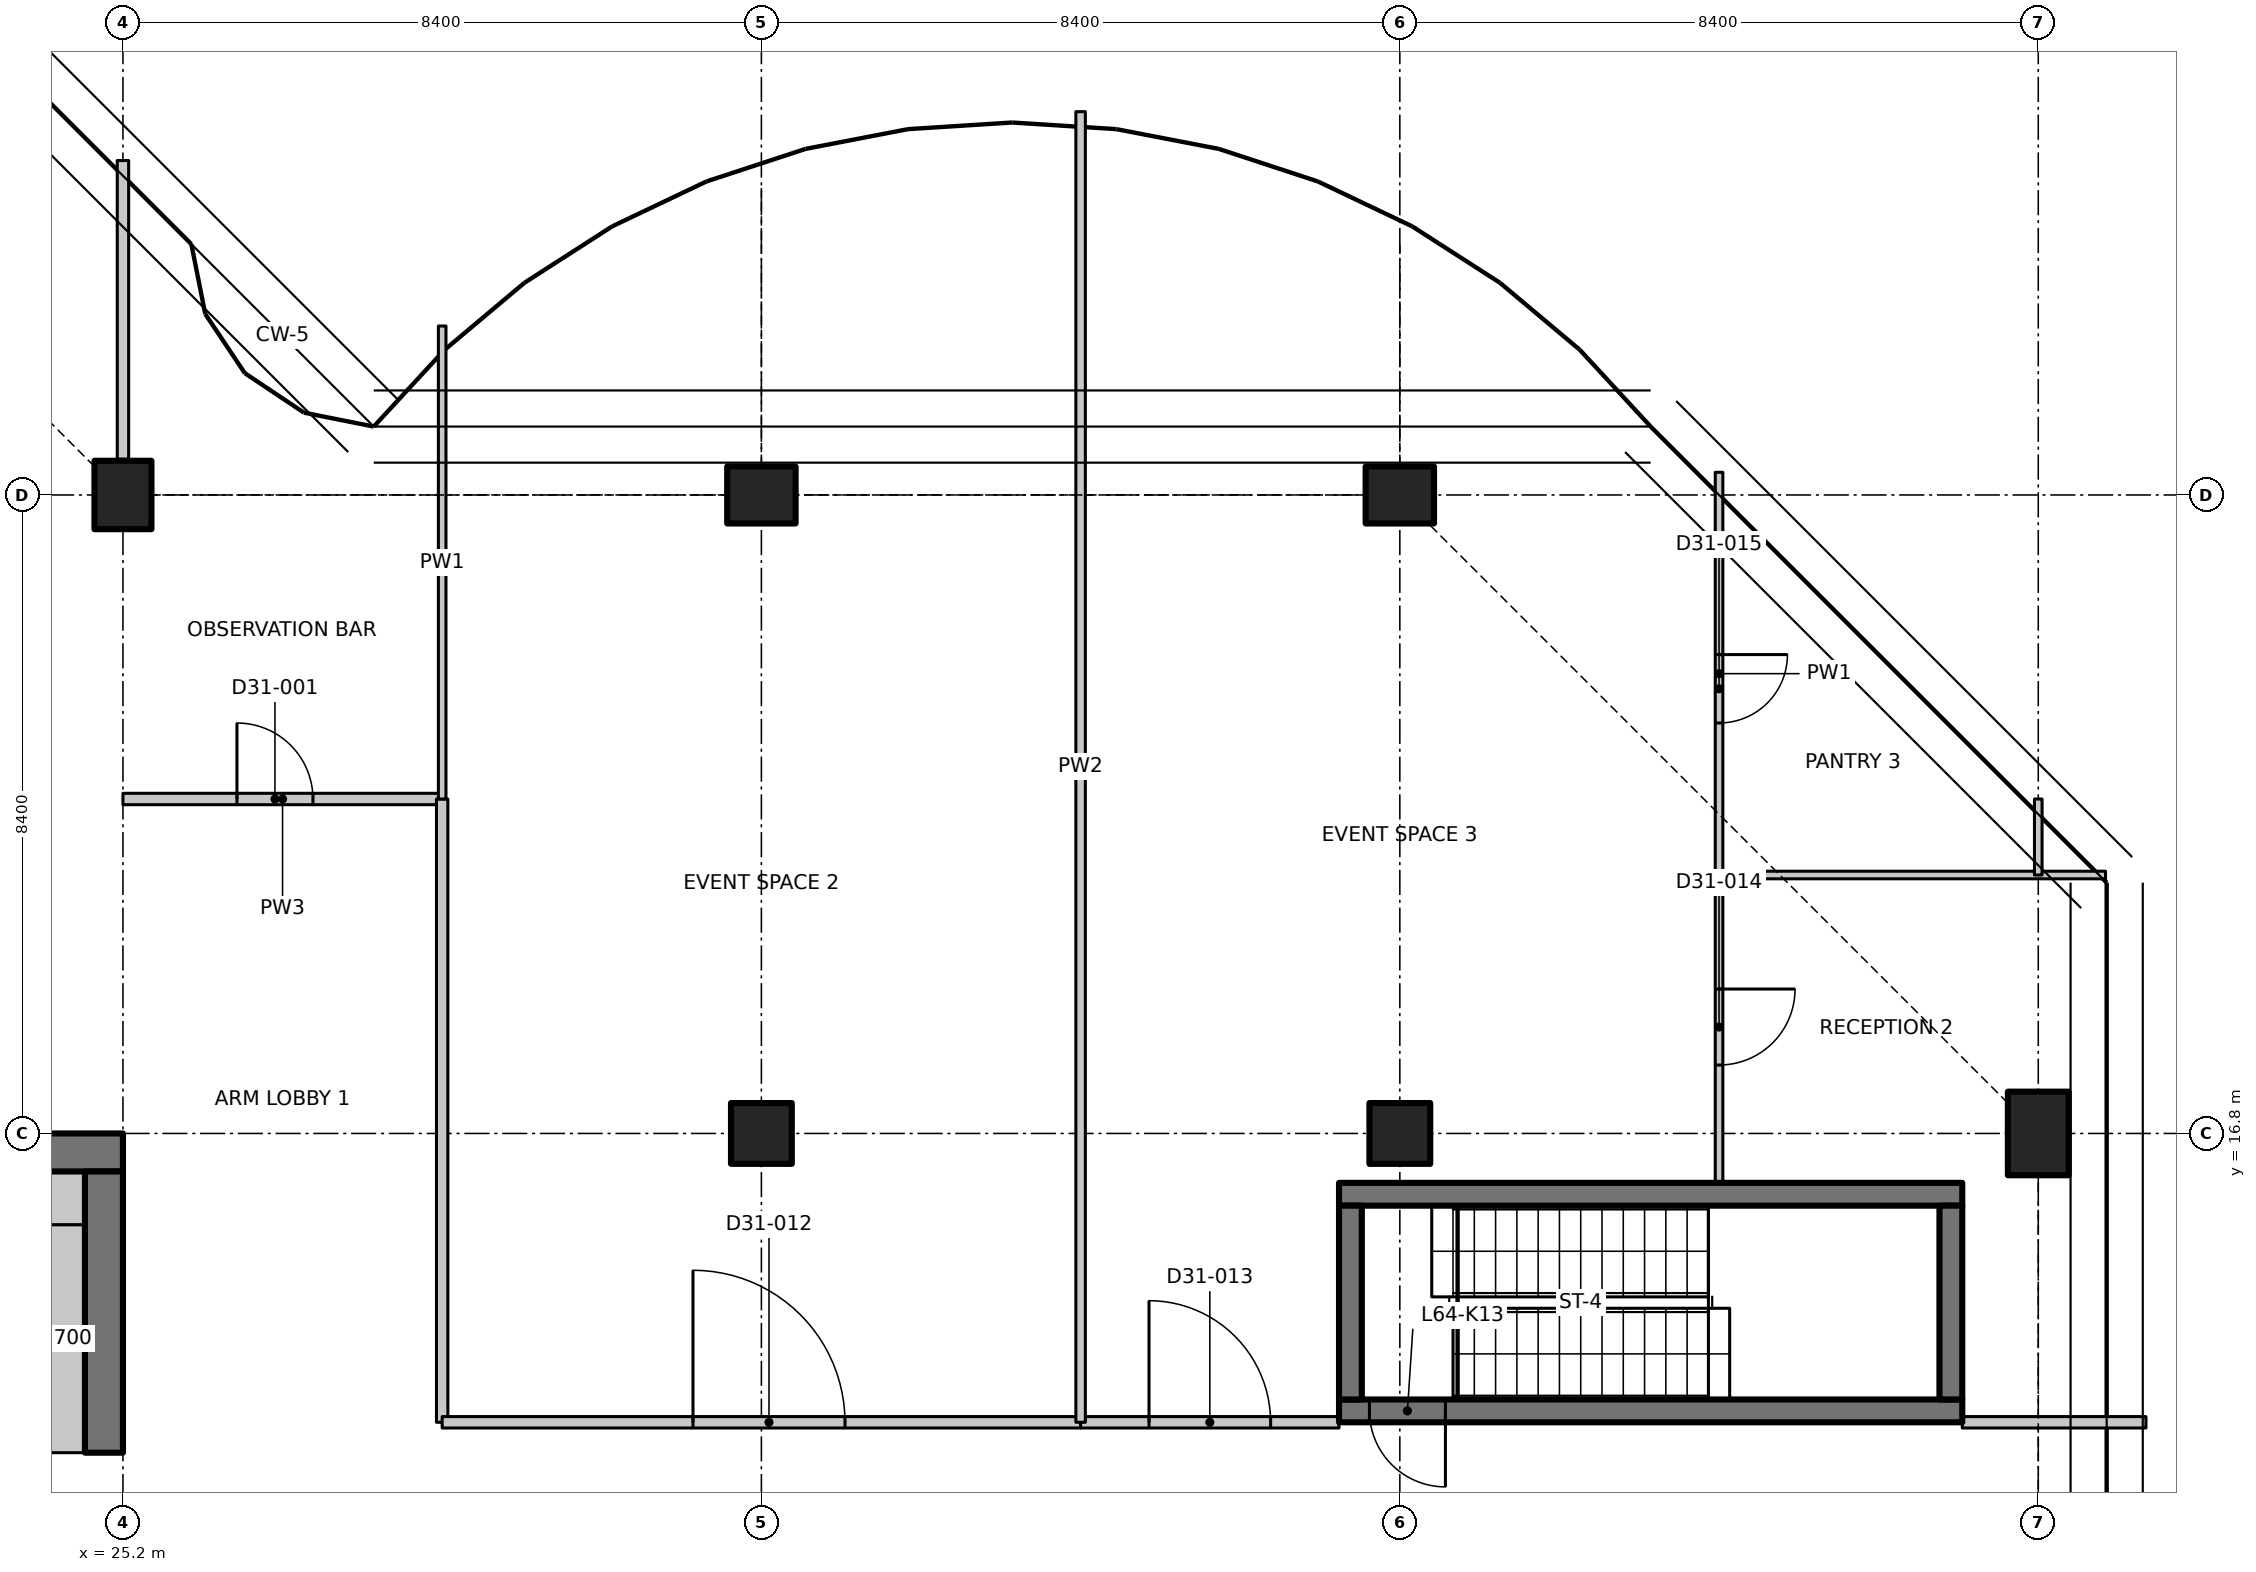
"""IFC4 building model, lengths in metres.
Left out: names, types, materials, properties, quantities, classifications, styles, units other than length and angle.
Written with IfcOpenShell. Run it as: python <this file> out.ifc"""

import sys

from ifc_helpers import new_model, si_unit, direction, frame, frame_2d, origin, origin_2d, place, context, subcontext, project, spatial, polyline, rectangle, outline, extrude, element, fill, save


model = new_model("IFC4")
c1 = context("Model", 3, precision=1e-05, world=origin(), true_north=direction((0.0, 1.0)))
c2 = subcontext(c1, "Body", "Model", "MODEL_VIEW")
j1 = project(units=[si_unit("LENGTHUNIT", "METRE"), si_unit("PLANEANGLEUNIT", "RADIAN")], contexts=[c1])
p1 = place(None, origin())
s1 = spatial("IfcSite", under=j1, at=p1, CompositionType="ELEMENT")
p2 = place(p1, origin())
s2 = spatial("IfcBuilding", under=s1, at=p2, CompositionType="ELEMENT")
p3 = place(p2, frame((0.0, 0.0, 251.7)))
s3 = spatial("IfcBuildingStorey", under=s2, at=p3, CompositionType="ELEMENT", Elevation=251.7)
p4 = place(p3, frame((25.2, 25.2, 0.0), z_axis=(0.0, 0.0, 1.0), x_axis=(1.0, 0.0, 0.0)))
e1 = element("IfcColumn", 1, at=p4, inside=s3, PredefinedType="COLUMN", context=c2, shape_type="SweptSolid", body=[
    extrude(rectangle(XDim=0.75, YDim=0.9, at=origin_2d()), origin(), (0.0, 0.0, 1.0), 4.05),
])
p5 = place(p3, frame((33.6, 16.8, 0.0), z_axis=(0.0, 0.0, 1.0), x_axis=(1.0, 0.0, 0.0)))
e2 = element("IfcColumn", 2, at=p5, inside=s3, PredefinedType="COLUMN", context=c2, shape_type="SweptSolid", body=[
    extrude(rectangle(XDim=0.8, YDim=0.8, at=origin_2d()), origin(), (0.0, 0.0, 1.0), 4.05),
])
p6 = place(p3, frame((33.6, 25.2, 0.0), z_axis=(0.0, 0.0, 1.0), x_axis=(0.0, 1.0, 0.0)))
e3 = element("IfcColumn", 3, at=p6, inside=s3, PredefinedType="COLUMN", context=c2, shape_type="SweptSolid", body=[
    extrude(rectangle(XDim=0.75, YDim=0.9, at=origin_2d()), origin(), (0.0, 0.0, 1.0), 4.05),
])
p7 = place(p3, frame((42.0, 16.8, 0.0), z_axis=(0.0, 0.0, 1.0), x_axis=(1.0, 0.0, 0.0)))
e4 = element("IfcColumn", 4, at=p7, inside=s3, PredefinedType="COLUMN", context=c2, shape_type="SweptSolid", body=[
    extrude(rectangle(XDim=0.8, YDim=0.8, at=origin_2d()), origin(), (0.0, 0.0, 1.0), 4.05),
])
p8 = place(p3, frame((42.0, 25.2, 0.0), z_axis=(0.0, 0.0, 1.0), x_axis=(0.0, 1.0, 0.0)))
e5 = element("IfcColumn", 5, at=p8, inside=s3, PredefinedType="COLUMN", context=c2, shape_type="SweptSolid", body=[
    extrude(rectangle(XDim=0.75, YDim=0.9, at=origin_2d()), origin(), (0.0, 0.0, 1.0), 4.05),
])
p9 = place(p3, frame((50.4, 16.8, 0.0), z_axis=(0.0, 0.0, 1.0), x_axis=(1.0, 0.0, 0.0)))
e6 = element("IfcColumn", 6, at=p9, inside=s3, PredefinedType="COLUMN", context=c2, shape_type="SweptSolid", body=[
    extrude(rectangle(XDim=0.8, YDim=1.1, at=origin_2d()), origin(), (0.0, 0.0, 1.0), 4.05),
])
p10 = place(p3, frame((23.8, 16.55, 0.0), z_axis=(0.0, 0.0, 1.0), x_axis=(1.0, 0.0, 0.0)))
e7 = element("IfcWall", 7, at=p10, inside=s3, PredefinedType="SHEAR", context=c2, shape_type="SweptSolid", body=[
    extrude(rectangle(XDim=1.4, YDim=0.5, at=frame_2d((0.7, 0.0))), origin(), (0.0, 0.0, 1.0), 4.05),
])
p11 = place(p3, frame((24.95, 12.6, 0.0), z_axis=(0.0, 0.0, 1.0), x_axis=(0.0, 1.0, 0.0)))
e8 = element("IfcWall", 8, at=p11, inside=s3, PredefinedType="SHEAR", context=c2, shape_type="SweptSolid", body=[
    extrude(rectangle(XDim=3.7, YDim=0.5, at=frame_2d((1.85, 0.0))), origin(), (0.0, 0.0, 1.0), 4.05),
])
p12 = place(p3, frame((24.35, 12.6, 0.0), z_axis=(0.0, 0.0, 1.0), x_axis=(0.0, 1.0, 0.0)))
e9 = element("IfcWall", 9, at=p12, inside=s3, PredefinedType="PARTITIONING", context=c2, shape_type="SweptSolid", body=[
    extrude(rectangle(XDim=3.0, YDim=0.7, at=frame_2d((1.5, 0.0))), origin(), (0.0, 0.0, 1.0), 4.05),
])
p13 = place(p3, frame((23.8, 15.95, 0.0), z_axis=(0.0, 0.0, 1.0), x_axis=(1.0, 0.0, 0.0)))
e10 = element("IfcWall", 10, at=p13, inside=s3, PredefinedType="PARTITIONING", context=c2, shape_type="SweptSolid", body=[
    extrude(rectangle(XDim=0.9, YDim=0.7, at=frame_2d((0.45, 0.0))), origin(), (0.0, 0.0, 1.0), 4.05),
])
p14 = place(p3, frame((49.4, 13.15, 0.0), z_axis=(0.0, 0.0, 1.0), x_axis=(-1.0, 0.0, 0.0)))
e11 = element("IfcWall", 11, at=p14, inside=s3, PredefinedType="SHEAR", context=c2, shape_type="SweptSolid", body=[
    extrude(rectangle(XDim=8.2, YDim=0.3, at=frame_2d((4.1, 0.0))), origin(), (0.0, 0.0, 1.0), 4.05),
])
p15 = place(p14, frame((6.8, 0.0, 0.0)))
e12 = element("IfcOpeningElement", 12, at=p15, cuts=e11, PredefinedType="OPENING", context=c2, shape_type="SweptSolid", body=[
    extrude(rectangle(XDim=1.0, YDim=2.1, at=frame_2d((0.5, 1.05))), frame((0.0, 0.16, 0.0), z_axis=(0.0, -1.0, 0.0), x_axis=(1.0, 0.0, 0.0)), (0.0, 0.0, 1.0), 0.32),
])
p16 = place(p3, frame((41.2, 16.0, 0.0), z_axis=(0.0, 0.0, 1.0), x_axis=(1.0, 0.0, 0.0)))
e13 = element("IfcWall", 13, at=p16, inside=s3, PredefinedType="SHEAR", context=c2, shape_type="SweptSolid", body=[
    extrude(rectangle(XDim=8.2, YDim=0.3, at=frame_2d((4.1, 0.0))), origin(), (0.0, 0.0, 1.0), 4.05),
])
for number, where, z_axis, x_axis in (
    (14, (41.35, 13.3, 0.0), (0.0, 0.0, 1.0), (0.0, 1.0, 0.0)),
    (15, (49.25, 13.3, 0.0), (0.0, 0.0, 1.0), (0.0, 1.0, 0.0)),
):
    element("IfcWall", number, at=place(p3, frame(where, z_axis=z_axis, x_axis=x_axis)), inside=s3, PredefinedType="SHEAR", context=c2, shape_type="SweptSolid", body=[
        extrude(rectangle(XDim=2.55, YDim=0.3, at=frame_2d((1.275, 0.0))), origin(), (0.0, 0.0, 1.0), 4.05),
    ])
p17 = place(p3, frame((25.2, 21.2, 0.0), z_axis=(0.0, 0.0, 1.0), x_axis=(1.0, 0.0, 0.0)))
e16 = element("IfcWall", 16, at=p17, inside=s3, PredefinedType="PARTITIONING", context=c2, shape_type="SweptSolid", body=[
    extrude(rectangle(XDim=4.2, YDim=0.15, at=frame_2d((2.1, 0.0))), origin(), (0.0, 0.0, 1.0), 4.03),
])
p18 = place(p17, frame((1.5, 0.0, 0.0)))
e17 = element("IfcOpeningElement", 17, at=p18, cuts=e16, PredefinedType="OPENING", context=c2, shape_type="SweptSolid", body=[
    extrude(rectangle(XDim=1.0, YDim=2.1, at=frame_2d((0.5, 1.05))), frame((0.0, 0.085, 0.0), z_axis=(0.0, -1.0, 0.0), x_axis=(1.0, 0.0, 0.0)), (0.0, 0.0, 1.0), 0.17),
])
p19 = place(p3, frame((29.4, 21.2, 0.0), z_axis=(0.0, 0.0, 1.0), x_axis=(0.0, -1.0, 0.0)))
e18 = element("IfcWall", 18, at=p19, inside=s3, PredefinedType="PARTITIONING", context=c2, shape_type="SweptSolid", body=[
    extrude(rectangle(XDim=8.2, YDim=0.15, at=frame_2d((4.1, 0.0))), origin(), (0.0, 0.0, 1.0), 4.03),
])
p20 = place(p3, frame((29.4, 27.423, 0.0), z_axis=(0.0, 0.0, 1.0), x_axis=(0.0, -1.0, 0.0)))
e19 = element("IfcWall", 19, at=p20, inside=s3, PredefinedType="PARTITIONING", context=c2, shape_type="SweptSolid", body=[
    extrude(outline(polyline([(0.0, 0.0), (6.223, 0.0), (6.223, 4.03), (2.673, 4.03), (2.671, 3.68), (1.775, 3.68), (1.773, 4.03), (0.148, 4.03), (0.0, 4.03), (0.0, 0.0)])), frame((0.0, 0.05, 0.0), z_axis=(0.0, -1.0, 0.0), x_axis=(1.0, 0.0, 0.0)), (0.0, 0.0, 1.0), 0.1),
])
p21 = place(p3, frame((25.2, 25.67, 0.0), z_axis=(0.0, 0.0, 1.0), x_axis=(0.0, 1.0, 0.0)))
e20 = element("IfcWall", 20, at=p21, inside=s3, PredefinedType="PARTITIONING", context=c2, shape_type="SweptSolid", body=[
    extrude(rectangle(XDim=3.93, YDim=0.15, at=frame_2d((1.965, 0.0))), origin(), (0.0, 0.0, 1.0), 3.68),
])
p22 = place(p3, frame((29.4, 13.0, 0.0), z_axis=(0.0, 0.0, 1.0), x_axis=(1.0, 0.0, 0.0)))
e21 = element("IfcWall", 21, at=p22, inside=s3, PredefinedType="PARTITIONING", context=c2, shape_type="SweptSolid", body=[
    extrude(rectangle(XDim=8.4, YDim=0.15, at=frame_2d((4.2, 0.0))), origin(), (0.0, 0.0, 1.0), 4.03),
])
p23 = place(p22, frame((3.3, 0.0, 0.0)))
e22 = element("IfcOpeningElement", 22, at=p23, cuts=e21, PredefinedType="OPENING", context=c2, shape_type="SweptSolid", body=[
    extrude(rectangle(XDim=2.0, YDim=2.4, at=frame_2d((1.0, 1.2))), frame((0.0, 0.085, 0.0), z_axis=(0.0, -1.0, 0.0), x_axis=(1.0, 0.0, 0.0)), (0.0, 0.0, 1.0), 0.17),
])
p24 = place(p3, frame((37.8, 13.0, 0.0), z_axis=(0.0, 0.0, 1.0), x_axis=(1.0, 0.0, 0.0)))
e23 = element("IfcWall", 23, at=p24, inside=s3, PredefinedType="PARTITIONING", context=c2, shape_type="SweptSolid", body=[
    extrude(rectangle(XDim=3.4, YDim=0.15, at=frame_2d((1.7, 0.0))), origin(), (0.0, 0.0, 1.0), 4.03),
])
p25 = place(p24, frame((0.9, 0.0, 0.0)))
e24 = element("IfcOpeningElement", 24, at=p25, cuts=e23, PredefinedType="OPENING", context=c2, shape_type="SweptSolid", body=[
    extrude(rectangle(XDim=1.6, YDim=2.1, at=frame_2d((0.8, 1.05))), frame((0.0, 0.085, 0.0), z_axis=(0.0, -1.0, 0.0), x_axis=(1.0, 0.0, 0.0)), (0.0, 0.0, 1.0), 0.17),
])
p26 = place(p3, frame((49.4, 13.0, 0.0), z_axis=(0.0, 0.0, 1.0), x_axis=(1.0, 0.0, 0.0)))
e25 = element("IfcWall", 25, at=p26, inside=s3, PredefinedType="PARTITIONING", context=c2, shape_type="SweptSolid", body=[
    extrude(rectangle(XDim=2.417, YDim=0.15, at=frame_2d((1.208, 0.0))), origin(), (0.0, 0.0, 1.0), 3.68),
])
p27 = place(p3, frame((37.8, 30.243, 0.0), z_axis=(0.0, 0.0, 1.0), x_axis=(0.0, -1.0, 0.0)))
e26 = element("IfcWall", 26, at=p27, inside=s3, PredefinedType="PARTITIONING", context=c2, shape_type="SweptSolid", body=[
    extrude(outline(polyline([(0.0, 0.0), (17.243, 0.0), (17.243, 4.03), (5.493, 4.03), (5.491, 3.68), (4.595, 3.68), (4.593, 4.03), (0.0, 4.03), (0.0, 0.0)])), frame((0.0, 0.062, 0.0), z_axis=(0.0, -1.0, 0.0), x_axis=(1.0, 0.0, 0.0)), (0.0, 0.0, 1.0), 0.125),
])
p28 = place(p3, frame((46.2, 20.2, 0.0), z_axis=(0.0, 0.0, 1.0), x_axis=(0.0, -1.0, 0.0)))
e27 = element("IfcWall", 27, at=p28, inside=s3, PredefinedType="PARTITIONING", context=c2, shape_type="SweptSolid", body=[
    extrude(rectangle(XDim=4.05, YDim=0.1, at=frame_2d((2.025, 0.0))), origin(), (0.0, 0.0, 1.0), 4.03),
])
p29 = place(p28, frame((1.5, 0.0, 0.0)))
e28 = element("IfcOpeningElement", 28, at=p29, cuts=e27, PredefinedType="OPENING", context=c2, shape_type="SweptSolid", body=[
    extrude(rectangle(XDim=1.0, YDim=2.1, at=frame_2d((0.5, 1.05))), frame((0.0, 0.06, 0.0), z_axis=(0.0, -1.0, 0.0), x_axis=(1.0, 0.0, 0.0)), (0.0, 0.0, 1.0), 0.12),
])
p30 = place(p3, frame((46.2, 25.498, 0.0), z_axis=(0.0, 0.0, 1.0), x_axis=(0.0, -1.0, 0.0)))
e29 = element("IfcWall", 29, at=p30, inside=s3, PredefinedType="PARTITIONING", context=c2, shape_type="SweptSolid", body=[
    extrude(outline(polyline([(0.0, 0.0), (5.298, 0.0), (5.298, 4.03), (5.164, 4.03), (5.162, 3.68), (3.835, 3.68), (3.833, 4.03), (0.098, 4.03), (0.0, 4.03), (0.0, 0.0)])), frame((0.0, 0.05, 0.0), z_axis=(0.0, -1.0, 0.0), x_axis=(1.0, 0.0, 0.0)), (0.0, 0.0, 1.0), 0.1),
])
p31 = place(p30, frame((2.398, 0.0, 0.0)))
e30 = element("IfcOpeningElement", 30, at=p31, cuts=e29, PredefinedType="OPENING", context=c2, shape_type="SweptSolid", body=[
    extrude(rectangle(XDim=0.9, YDim=2.1, at=frame_2d((0.45, 1.05))), frame((0.0, 0.06, 0.0), z_axis=(0.0, -1.0, 0.0), x_axis=(1.0, 0.0, 0.0)), (0.0, 0.0, 1.0), 0.12),
])
p32 = place(p3, frame((46.2, 20.2, 0.0), z_axis=(0.0, 0.0, 1.0), x_axis=(1.0, 0.0, 0.0)))
e31 = element("IfcWall", 31, at=p32, inside=s3, PredefinedType="PARTITIONING", context=c2, shape_type="SweptSolid", body=[
    extrude(rectangle(XDim=5.085, YDim=0.1, at=frame_2d((2.542, 0.0))), origin(), (0.0, 0.0, 1.0), 3.68),
])
p33 = place(p3, frame((50.4, 20.2, 0.0), z_axis=(0.0, 0.0, 1.0), x_axis=(0.0, 1.0, 0.0)))
e32 = element("IfcWall", 32, at=p33, inside=s3, PredefinedType="PARTITIONING", context=c2, shape_type="SweptSolid", body=[
    extrude(rectangle(XDim=1.0, YDim=0.1, at=frame_2d((0.5, 0.0))), origin(), (0.0, 0.0, 1.0), 4.03),
])
p34 = place(p15, origin())
e33 = element("IfcDoor", 33, at=p34, inside=s3, OperationType="SINGLE_SWING_LEFT", PredefinedType="DOOR", context=c2, shape_type="SweptSolid", body=[
    extrude(rectangle(XDim=1.0, YDim=2.1, at=frame_2d((0.5, 1.05))), frame((0.0, 0.025, 0.0), z_axis=(0.0, -1.0, 0.0), x_axis=(1.0, 0.0, 0.0)), (0.0, 0.0, 1.0), 0.05),
])
fill(e12, e33)
p35 = place(p18, origin())
e34 = element("IfcDoor", 34, at=p35, inside=s3, OperationType="SINGLE_SWING_LEFT", PredefinedType="DOOR", context=c2, shape_type="SweptSolid", body=[
    extrude(rectangle(XDim=1.0, YDim=2.1, at=frame_2d((0.5, 1.05))), frame((0.0, 0.025, 0.0), z_axis=(0.0, -1.0, 0.0), x_axis=(1.0, 0.0, 0.0)), (0.0, 0.0, 1.0), 0.05),
])
fill(e17, e34)
p36 = place(p23, origin())
e35 = element("IfcDoor", 35, at=p36, inside=s3, OperationType="DOUBLE_DOOR_SINGLE_SWING", PredefinedType="DOOR", context=c2, shape_type="SweptSolid", body=[
    extrude(rectangle(XDim=2.0, YDim=2.4, at=frame_2d((1.0, 1.2))), frame((0.0, 0.025, 0.0), z_axis=(0.0, -1.0, 0.0), x_axis=(1.0, 0.0, 0.0)), (0.0, 0.0, 1.0), 0.05),
])
fill(e22, e35)
p37 = place(p25, origin())
e36 = element("IfcDoor", 36, at=p37, inside=s3, OperationType="DOUBLE_DOOR_SINGLE_SWING", PredefinedType="DOOR", context=c2, shape_type="SweptSolid", body=[
    extrude(rectangle(XDim=1.6, YDim=2.1, at=frame_2d((0.8, 1.05))), frame((0.0, 0.025, 0.0), z_axis=(0.0, -1.0, 0.0), x_axis=(1.0, 0.0, 0.0)), (0.0, 0.0, 1.0), 0.05),
])
fill(e24, e36)
p38 = place(p29, origin())
e37 = element("IfcDoor", 37, at=p38, inside=s3, OperationType="SINGLE_SWING_LEFT", PredefinedType="DOOR", context=c2, shape_type="SweptSolid", body=[
    extrude(rectangle(XDim=1.0, YDim=2.1, at=frame_2d((0.5, 1.05))), frame((0.0, 0.025, 0.0), z_axis=(0.0, -1.0, 0.0), x_axis=(1.0, 0.0, 0.0)), (0.0, 0.0, 1.0), 0.05),
])
fill(e28, e37)
p39 = place(p31, origin())
e38 = element("IfcDoor", 38, at=p39, inside=s3, OperationType="SINGLE_SWING_LEFT", PredefinedType="DOOR", context=c2, shape_type="SweptSolid", body=[
    extrude(rectangle(XDim=0.9, YDim=2.1, at=frame_2d((0.45, 1.05))), frame((0.0, 0.025, 0.0), z_axis=(0.0, -1.0, 0.0), x_axis=(1.0, 0.0, 0.0)), (0.0, 0.0, 1.0), 0.05),
])
fill(e30, e38)
save(model, sys.argv[1])
